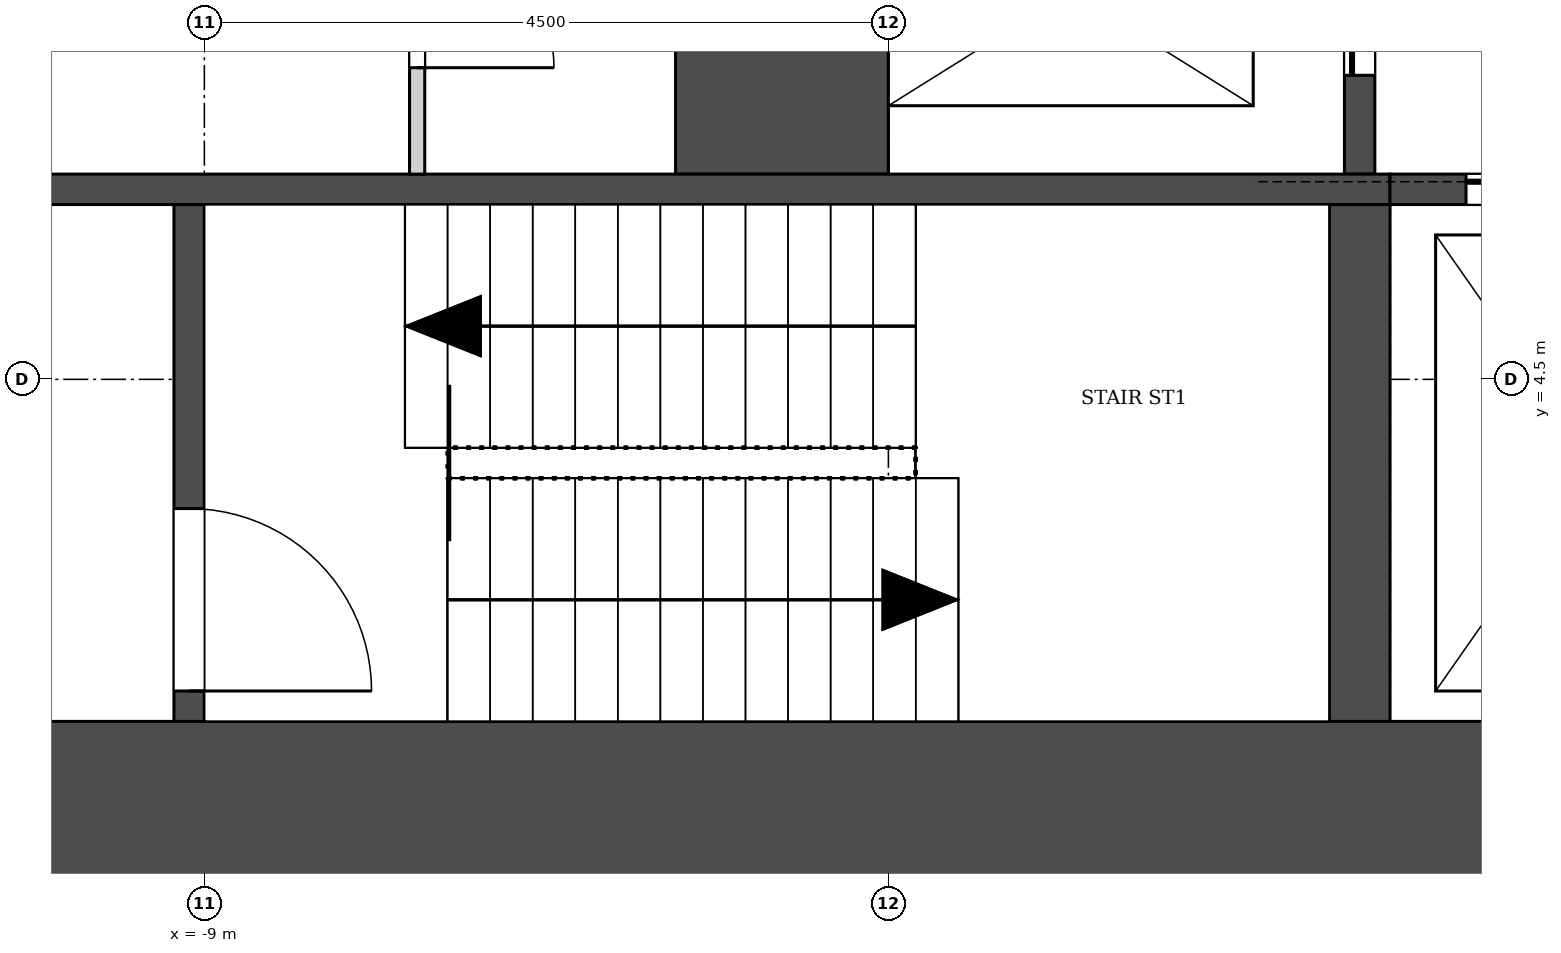
"""IFC4 building model, lengths in metres.
Left out: names, types, materials, properties, quantities, classifications, styles, units other than length and angle.
Written with IfcOpenShell. Run it as: python <this file> out.ifc"""

import sys

from ifc_helpers import new_model, si_unit, direction, frame, frame_2d, origin, place, context, subcontext, project, spatial, rectangle, extrude, element, fill, save


model = new_model("IFC4")
c1 = context("Model", 3, precision=1e-05, world=origin(), true_north=direction((0.0, 1.0)))
c2 = subcontext(c1, "Body", "Model", "MODEL_VIEW")
j1 = project(units=[si_unit("LENGTHUNIT", "METRE"), si_unit("PLANEANGLEUNIT", "RADIAN")], contexts=[c1])
p1 = place(None, origin())
s1 = spatial("IfcSite", under=j1, at=p1, CompositionType="ELEMENT")
p2 = place(p1, origin())
s2 = spatial("IfcBuilding", under=s1, at=p2, CompositionType="ELEMENT")
p3 = place(p2, frame((0.0, 0.0, -8.0)))
s3 = spatial("IfcBuildingStorey", under=s2, at=p3, CompositionType="ELEMENT", Elevation=-8.0)
p4 = place(p3, frame((-14.0, 1.55, 0.0), z_axis=(0.0, 0.0, 1.0), x_axis=(1.0, 0.0, 0.0)))
e1 = element("IfcWall", 1, at=p4, inside=s3, PredefinedType="SHEAR", context=c2, shape_type="SweptSolid", body=[
    extrude(rectangle(XDim=28.0, YDim=1.4, at=frame_2d((14.0, 0.0))), origin(), (0.0, 0.0, 1.0), 8.0),
])
p5 = place(p3, frame((-1.4, 5.85, -0.35), z_axis=(0.0, 0.0, 1.0), x_axis=(0.0, 1.0, 0.0)))
e2 = element("IfcWall", 2, at=p5, inside=s3, PredefinedType="SOLIDWALL", context=c2, shape_type="SweptSolid", body=[
    extrude(rectangle(XDim=11.75, YDim=0.2, at=frame_2d((5.875, 0.0))), origin(), (0.0, 0.0, 1.0), 7.95),
])
p6 = place(p5, frame((3.2, 0.0, 0.35)))
e3 = element("IfcOpeningElement", 3, at=p6, cuts=e2, PredefinedType="OPENING", context=c2, shape_type="SweptSolid", body=[
    extrude(rectangle(XDim=1.2, YDim=2.1, at=frame_2d((0.6, 1.05))), frame((0.0, 0.11, 0.0), z_axis=(0.0, -1.0, 0.0), x_axis=(1.0, 0.0, 0.0)), (0.0, 0.0, 1.0), 0.22),
])
p7 = place(p5, frame((0.65, 0.0, 0.35)))
e4 = element("IfcOpeningElement", 4, at=p7, cuts=e2, PredefinedType="OPENING", context=c2, shape_type="SweptSolid", body=[
    extrude(rectangle(XDim=1.1, YDim=2.1, at=frame_2d((0.55, 1.05))), frame((0.0, 0.11, 0.0), z_axis=(0.0, -1.0, 0.0), x_axis=(1.0, 0.0, 0.0)), (0.0, 0.0, 1.0), 0.22),
])
p8 = place(p5, frame((5.9, 0.0, 0.35)))
e5 = element("IfcOpeningElement", 5, at=p8, cuts=e2, PredefinedType="OPENING", context=c2, shape_type="SweptSolid", body=[
    extrude(rectangle(XDim=1.0, YDim=2.1, at=frame_2d((0.5, 1.05))), frame((0.0, 0.11, 0.0), z_axis=(0.0, -1.0, 0.0), x_axis=(1.0, 0.0, 0.0)), (0.0, 0.0, 1.0), 0.22),
])
p9 = place(p5, frame((8.5, 0.0, 0.35)))
e6 = element("IfcOpeningElement", 6, at=p9, cuts=e2, PredefinedType="OPENING", context=c2, shape_type="SweptSolid", body=[
    extrude(rectangle(XDim=1.0, YDim=2.1, at=frame_2d((0.5, 1.05))), frame((0.0, 0.11, 0.0), z_axis=(0.0, -1.0, 0.0), x_axis=(1.0, 0.0, 0.0)), (0.0, 0.0, 1.0), 0.22),
])
p10 = place(p3, frame((-5.2, 5.85, -0.35), z_axis=(0.0, 0.0, 1.0), x_axis=(0.0, 1.0, 0.0)))
e7 = element("IfcWall", 7, at=p10, inside=s3, PredefinedType="SOLIDWALL", context=c2, shape_type="SweptSolid", body=[
    extrude(rectangle(XDim=2.4, YDim=1.4, at=frame_2d((1.2, 0.0))), origin(), (0.0, 0.0, 1.0), 7.95),
])
p11 = place(p3, frame((-12.6, 5.75, -0.35), z_axis=(0.0, 0.0, 1.0), x_axis=(1.0, 0.0, 0.0)))
e8 = element("IfcWall", 8, at=p11, inside=s3, PredefinedType="SOLIDWALL", context=c2, shape_type="SweptSolid", body=[
    extrude(rectangle(XDim=11.4, YDim=0.2, at=frame_2d((5.7, 0.0))), origin(), (0.0, 0.0, 1.0), 7.95),
])
p12 = place(p3, frame((-1.2, 5.75, -0.35), z_axis=(0.0, 0.0, 1.0), x_axis=(1.0, 0.0, 0.0)))
e9 = element("IfcWall", 9, at=p12, inside=s3, PredefinedType="SOLIDWALL", context=c2, shape_type="SweptSolid", body=[
    extrude(rectangle(XDim=2.4, YDim=0.2, at=frame_2d((1.2, 0.0))), origin(), (0.0, 0.0, 1.0), 7.95),
])
p13 = place(p12, frame((0.5, 0.0, 0.35)))
e10 = element("IfcOpeningElement", 10, at=p13, cuts=e9, PredefinedType="OPENING", context=c2, shape_type="SweptSolid", body=[
    extrude(rectangle(XDim=1.4, YDim=2.1, at=frame_2d((0.7, 1.05))), frame((0.0, 0.11, 0.0), z_axis=(0.0, -1.0, 0.0), x_axis=(1.0, 0.0, 0.0)), (0.0, 0.0, 1.0), 0.22),
])
p14 = place(p3, frame((-9.1, 2.25, -0.35), z_axis=(0.0, 0.0, 1.0), x_axis=(0.0, 1.0, 0.0)))
e11 = element("IfcWall", 11, at=p14, inside=s3, PredefinedType="SOLIDWALL", context=c2, shape_type="SweptSolid", body=[
    extrude(rectangle(XDim=3.4, YDim=0.2, at=frame_2d((1.7, 0.0))), origin(), (0.0, 0.0, 1.0), 7.95),
])
p15 = place(p14, frame((0.2, 0.0, 0.35)))
e12 = element("IfcOpeningElement", 12, at=p15, cuts=e11, PredefinedType="OPENING", context=c2, shape_type="SweptSolid", body=[
    extrude(rectangle(XDim=1.2, YDim=2.1, at=frame_2d((0.6, 1.05))), frame((0.0, 0.11, 0.0), z_axis=(0.0, -1.0, 0.0), x_axis=(1.0, 0.0, 0.0)), (0.0, 0.0, 1.0), 0.22),
])
p16 = place(p3, frame((-1.4, 2.25, -0.35), z_axis=(0.0, 0.0, 1.0), x_axis=(0.0, 1.0, 0.0)))
e13 = element("IfcWall", 13, at=p16, inside=s3, PredefinedType="SOLIDWALL", context=c2, shape_type="SweptSolid", body=[
    extrude(rectangle(XDim=3.4, YDim=0.4, at=frame_2d((1.7, 0.0))), origin(), (0.0, 0.0, 1.0), 7.95),
])
p17 = place(p3, frame((-7.6, 5.85, 0.0), z_axis=(0.0, 0.0, 1.0), x_axis=(0.0, 1.0, 0.0)))
e14 = element("IfcWall", 14, at=p17, inside=s3, PredefinedType="PARTITIONING", context=c2, shape_type="SweptSolid", body=[
    extrude(rectangle(XDim=2.4, YDim=0.1, at=frame_2d((1.2, 0.0))), origin(), (0.0, 0.0, 1.0), 7.6),
])
p18 = place(p17, frame((0.7, 0.0, 0.0)))
e15 = element("IfcOpeningElement", 15, at=p18, cuts=e14, PredefinedType="OPENING", context=c2, shape_type="SweptSolid", body=[
    extrude(rectangle(XDim=0.9, YDim=2.1, at=frame_2d((0.45, 1.05))), frame((0.0, 0.06, 0.0), z_axis=(0.0, -1.0, 0.0), x_axis=(1.0, 0.0, 0.0)), (0.0, 0.0, 1.0), 0.12),
])
p19 = place(p7, origin())
e16 = element("IfcDoor", 16, at=p19, inside=s3, OperationType="SLIDING_TO_RIGHT", PredefinedType="DOOR", context=c2, shape_type="SweptSolid", body=[
    extrude(rectangle(XDim=1.1, YDim=2.1, at=frame_2d((0.55, 1.05))), frame((0.0, 0.025, 0.0), z_axis=(0.0, -1.0, 0.0), x_axis=(1.0, 0.0, 0.0)), (0.0, 0.0, 1.0), 0.05),
])
fill(e4, e16)
p20 = place(p13, origin())
e17 = element("IfcDoor", 17, at=p20, inside=s3, OperationType="SLIDING_TO_LEFT", PredefinedType="DOOR", context=c2, shape_type="SweptSolid", body=[
    extrude(rectangle(XDim=1.4, YDim=2.1, at=frame_2d((0.7, 1.05))), frame((0.0, 0.025, 0.0), z_axis=(0.0, -1.0, 0.0), x_axis=(1.0, 0.0, 0.0)), (0.0, 0.0, 1.0), 0.05),
])
fill(e10, e17)
p21 = place(p18, frame((0.9, 0.0, 0.0), z_axis=(0.0, 0.0, 1.0), x_axis=(-1.0, 0.0, 0.0)))
e18 = element("IfcDoor", 18, at=p21, inside=s3, OperationType="SINGLE_SWING_RIGHT", PredefinedType="DOOR", context=c2, shape_type="SweptSolid", body=[
    extrude(rectangle(XDim=0.9, YDim=2.1, at=frame_2d((0.45, 1.05))), frame((0.0, 0.025, 0.0), z_axis=(0.0, -1.0, 0.0), x_axis=(1.0, 0.0, 0.0)), (0.0, 0.0, 1.0), 0.05),
])
fill(e15, e18)
p22 = place(p15, frame((1.2, 0.0, 0.0), z_axis=(0.0, 0.0, 1.0), x_axis=(-1.0, 0.0, 0.0)))
e19 = element("IfcDoor", 19, at=p22, inside=s3, OperationType="SINGLE_SWING_RIGHT", PredefinedType="DOOR", context=c2, shape_type="SweptSolid", body=[
    extrude(rectangle(XDim=1.2, YDim=2.1, at=frame_2d((0.6, 1.05))), frame((0.0, 0.025, 0.0), z_axis=(0.0, -1.0, 0.0), x_axis=(1.0, 0.0, 0.0)), (0.0, 0.0, 1.0), 0.05),
])
fill(e12, e19)
save(model, sys.argv[1])
